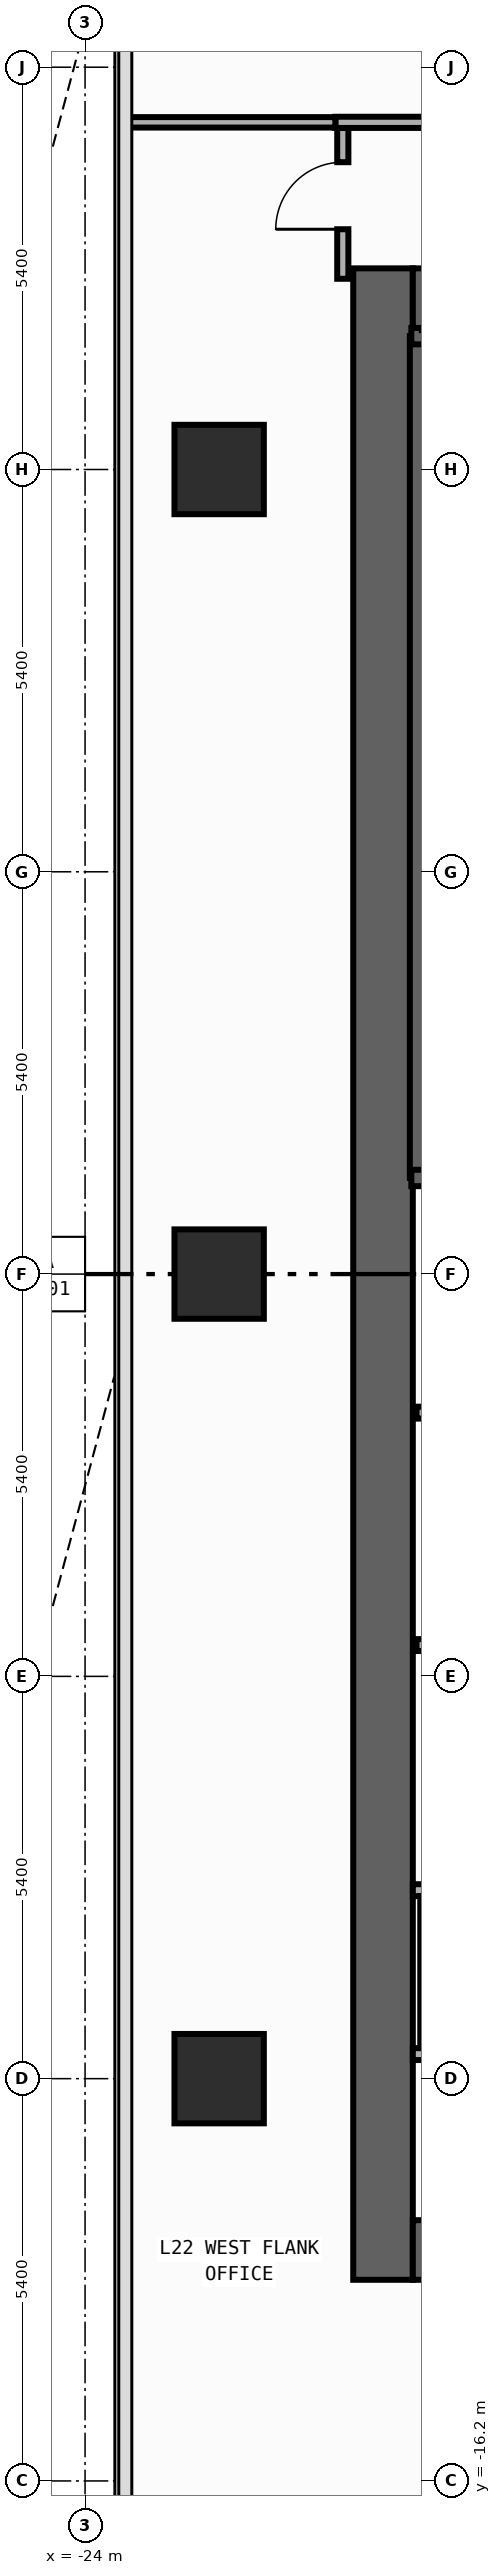
"""IFC4 building model, lengths in metres.
Left out: names, types, materials, properties, quantities, classifications, styles, units other than length and angle.
Written with IfcOpenShell. Run it as: python <this file> out.ifc"""

import sys

from ifc_helpers import new_model, si_unit, direction, frame, frame_2d, origin, origin_2d, place, context, subcontext, project, spatial, rectangle, extrude, element, fill, save


model = new_model("IFC4")
c1 = context("Model", 3, precision=1e-05, world=origin(), true_north=direction((0.0, 1.0)))
c2 = subcontext(c1, "Body", "Model", "MODEL_VIEW")
j1 = project(units=[si_unit("LENGTHUNIT", "METRE"), si_unit("PLANEANGLEUNIT", "RADIAN")], contexts=[c1])
p1 = place(None, origin())
s1 = spatial("IfcSite", under=j1, at=p1, CompositionType="ELEMENT")
p2 = place(p1, origin())
s2 = spatial("IfcBuilding", under=s1, at=p2, CompositionType="ELEMENT")
p3 = place(p2, frame((0.0, 0.0, 97.4)))
s3 = spatial("IfcBuildingStorey", under=s2, at=p3, CompositionType="ELEMENT", Elevation=97.4)
p4 = place(p3, frame((-20.0, -13.5, 0.0), z_axis=(0.0, 0.0, 1.0), x_axis=(0.0, 1.0, 0.0)))
e1 = element("IfcWall", 1, at=p4, inside=s3, PredefinedType="SHEAR", context=c2, shape_type="SweptSolid", body=[
    extrude(rectangle(XDim=27.0, YDim=0.8, at=frame_2d((13.5, 0.0))), origin(), (0.0, 0.0, 1.0), 3.94),
])
for number, where, z_axis, x_axis in (
    (2, (-19.6, -13.1, 0.0), (0.0, 0.0, 1.0), (1.0, 0.0, 0.0)),
    (3, (-19.6, 13.1, 0.0), (0.0, 0.0, 1.0), (1.0, 0.0, 0.0)),
):
    element("IfcWall", number, at=place(p3, frame(where, z_axis=z_axis, x_axis=x_axis)), inside=s3, PredefinedType="SHEAR", context=c2, shape_type="SweptSolid", body=[
        extrude(rectangle(XDim=6.8, YDim=0.8, at=frame_2d((3.4, 0.0))), origin(), (0.0, 0.0, 1.0), 3.94),
    ])
p5 = place(p3, frame((-19.53, 1.29, 0.0), z_axis=(0.0, 0.0, 1.0), x_axis=(0.0, 1.0, 0.0)))
e4 = element("IfcWall", 4, at=p5, inside=s3, PredefinedType="SHEAR", context=c2, shape_type="SweptSolid", body=[
    extrude(rectangle(XDim=11.3, YDim=0.22, at=frame_2d((5.65, 0.0))), origin(), (0.0, 0.0, 1.0), 3.94),
])
p6 = place(p3, frame((-19.62, 12.59, 0.0), z_axis=(0.0, 0.0, 1.0), x_axis=(1.0, 0.0, 0.0)))
e5 = element("IfcWall", 5, at=p6, inside=s3, PredefinedType="SHEAR", context=c2, shape_type="SweptSolid", body=[
    extrude(rectangle(XDim=3.915, YDim=0.22, at=frame_2d((1.958, 0.0))), origin(), (0.0, 0.0, 1.0), 3.94),
])
p7 = place(p3, frame((-19.62, 1.29, 0.0), z_axis=(0.0, 0.0, 1.0), x_axis=(1.0, 0.0, 0.0)))
e6 = element("IfcWall", 6, at=p7, inside=s3, PredefinedType="SHEAR", context=c2, shape_type="SweptSolid", body=[
    extrude(rectangle(XDim=3.915, YDim=0.22, at=frame_2d((1.958, 0.0))), origin(), (0.0, 0.0, 1.0), 3.94),
])
p8 = place(p7, frame((1.08, 0.0, 0.0)))
e7 = element("IfcOpeningElement", 7, at=p8, cuts=e6, PredefinedType="OPENING", context=c2, shape_type="SweptSolid", body=[
    extrude(rectangle(XDim=1.1, YDim=2.2, at=frame_2d((0.55, 1.1))), frame((0.0, 0.12, 0.0), z_axis=(0.0, -1.0, 0.0), x_axis=(1.0, 0.0, 0.0)), (0.0, 0.0, 1.0), 0.24),
])
for number, where, z_axis, x_axis in (
    (8, (-22.2, -10.8, 0.0), (0.0, 0.0, 1.0), (1.0, 0.0, 0.0)),
    (9, (-22.2, 0.0, 0.0), (0.0, 0.0, 1.0), (1.0, 0.0, 0.0)),
    (10, (-22.2, 10.8, 0.0), (0.0, 0.0, 1.0), (1.0, 0.0, 0.0)),
):
    element("IfcColumn", number, at=place(p3, frame(where, z_axis=z_axis, x_axis=x_axis)), inside=s3, PredefinedType="COLUMN", context=c2, shape_type="SweptSolid", body=[
        extrude(rectangle(XDim=1.2, YDim=1.2, at=origin_2d()), origin(), (0.0, 0.0, 1.0), 4.2),
    ])
p9 = place(p3, frame((-19.55, -1.86, 0.0), z_axis=(0.0, 0.0, 1.0), x_axis=(1.0, 0.0, 0.0)))
e11 = element("IfcWall", 11, at=p9, inside=s3, PredefinedType="STANDARD", context=c2, shape_type="SweptSolid", body=[
    extrude(rectangle(XDim=3.8, YDim=0.16, at=frame_2d((1.9, 0.0))), origin(), (0.0, 0.0, 1.0), 3.94),
])
p10 = place(p9, frame((1.18, 0.0, 0.0)))
e12 = element("IfcOpeningElement", 12, at=p10, cuts=e11, PredefinedType="OPENING", context=c2, shape_type="SweptSolid", body=[
    extrude(rectangle(XDim=1.15, YDim=2.2, at=frame_2d((0.575, 1.1))), frame((0.0, 0.09, 0.0), z_axis=(0.0, -1.0, 0.0), x_axis=(1.0, 0.0, 0.0)), (0.0, 0.0, 1.0), 0.18),
])
p11 = place(p3, frame((-19.55, -4.98, 0.0), z_axis=(0.0, 0.0, 1.0), x_axis=(1.0, 0.0, 0.0)))
e13 = element("IfcWall", 13, at=p11, inside=s3, PredefinedType="STANDARD", context=c2, shape_type="SweptSolid", body=[
    extrude(rectangle(XDim=3.8, YDim=0.16, at=frame_2d((1.9, 0.0))), origin(), (0.0, 0.0, 1.0), 3.94),
])
for number, where, z_axis, x_axis in (
    (14, (-19.6, -10.47, 0.0), (0.0, 0.0, 1.0), (1.0, 0.0, 0.0)),
    (15, (-19.6, -8.27, 0.0), (0.0, 0.0, 1.0), (1.0, 0.0, 0.0)),
):
    element("IfcWall", number, at=place(p3, frame(where, z_axis=z_axis, x_axis=x_axis)), inside=s3, PredefinedType="PARTITIONING", context=c2, shape_type="SweptSolid", body=[
        extrude(rectangle(XDim=2.29, YDim=0.16, at=frame_2d((1.145, 0.0))), origin(), (0.0, 0.0, 1.0), 3.94),
    ])
p12 = place(p3, frame((-20.54, 13.36, 0.0), z_axis=(0.0, 0.0, 1.0), x_axis=(0.0, 1.0, 0.0)))
e16 = element("IfcWall", 16, at=p12, inside=s3, PredefinedType="PARTITIONING", context=c2, shape_type="SweptSolid", body=[
    extrude(rectangle(XDim=2.025, YDim=0.15, at=frame_2d((1.012, 0.0))), origin(), (0.0, 0.0, 1.0), 3.94),
])
p13 = place(p12, frame((0.665, 0.0, 0.0)))
e17 = element("IfcOpeningElement", 17, at=p13, cuts=e16, PredefinedType="OPENING", context=c2, shape_type="SweptSolid", body=[
    extrude(rectangle(XDim=0.9, YDim=2.15, at=frame_2d((0.45, 1.075))), frame((0.0, 0.085, 0.0), z_axis=(0.0, -1.0, 0.0), x_axis=(1.0, 0.0, 0.0)), (0.0, 0.0, 1.0), 0.17),
])
p14 = place(p3, frame((-20.64, 15.46, 0.0), z_axis=(0.0, 0.0, 1.0), x_axis=(1.0, 0.0, 0.0)))
e18 = element("IfcWall", 18, at=p14, inside=s3, PredefinedType="PARTITIONING", context=c2, shape_type="SweptSolid", body=[
    extrude(rectangle(XDim=8.65, YDim=0.15, at=frame_2d((4.325, 0.0))), origin(), (0.0, 0.0, 1.0), 3.94),
])
p15 = place(p14, frame((2.871, 0.0, 0.0)))
e19 = element("IfcOpeningElement", 19, at=p15, cuts=e18, PredefinedType="OPENING", context=c2, shape_type="SweptSolid", body=[
    extrude(rectangle(XDim=0.9, YDim=2.15, at=frame_2d((0.45, 1.075))), frame((0.0, 0.085, 0.0), z_axis=(0.0, -1.0, 0.0), x_axis=(1.0, 0.0, 0.0)), (0.0, 0.0, 1.0), 0.17),
])
p16 = place(p3, frame((-23.455, 15.46, 0.0), z_axis=(0.0, 0.0, 1.0), x_axis=(1.0, 0.0, 0.0)))
e20 = element("IfcWall", 20, at=p16, inside=s3, PredefinedType="PARTITIONING", context=c2, shape_type="SweptSolid", body=[
    extrude(rectangle(XDim=2.815, YDim=0.14, at=frame_2d((1.408, 0.0))), origin(), (0.0, 0.0, 1.0), 3.94),
])
p17 = place(p3, frame((-19.45, -10.39, 0.0), z_axis=(0.0, 0.0, 1.0), x_axis=(0.0, 1.0, 0.0)))
e21 = element("IfcWall", 21, at=p17, inside=s3, PredefinedType="PARTITIONING", context=c2, shape_type="SweptSolid", body=[
    extrude(rectangle(XDim=2.04, YDim=0.1, at=frame_2d((1.02, 0.0))), origin(), (0.0, 0.0, 1.0), 3.94),
])
p18 = place(p13, origin())
e22 = element("IfcDoor", 22, at=p18, inside=s3, OperationType="SINGLE_SWING_LEFT", PredefinedType="DOOR", context=c2, shape_type="SweptSolid", body=[
    extrude(rectangle(XDim=0.9, YDim=2.15, at=frame_2d((0.45, 1.075))), frame((0.0, 0.025, 0.0), z_axis=(0.0, -1.0, 0.0), x_axis=(1.0, 0.0, 0.0)), (0.0, 0.0, 1.0), 0.05),
])
fill(e17, e22)
save(model, sys.argv[1])
